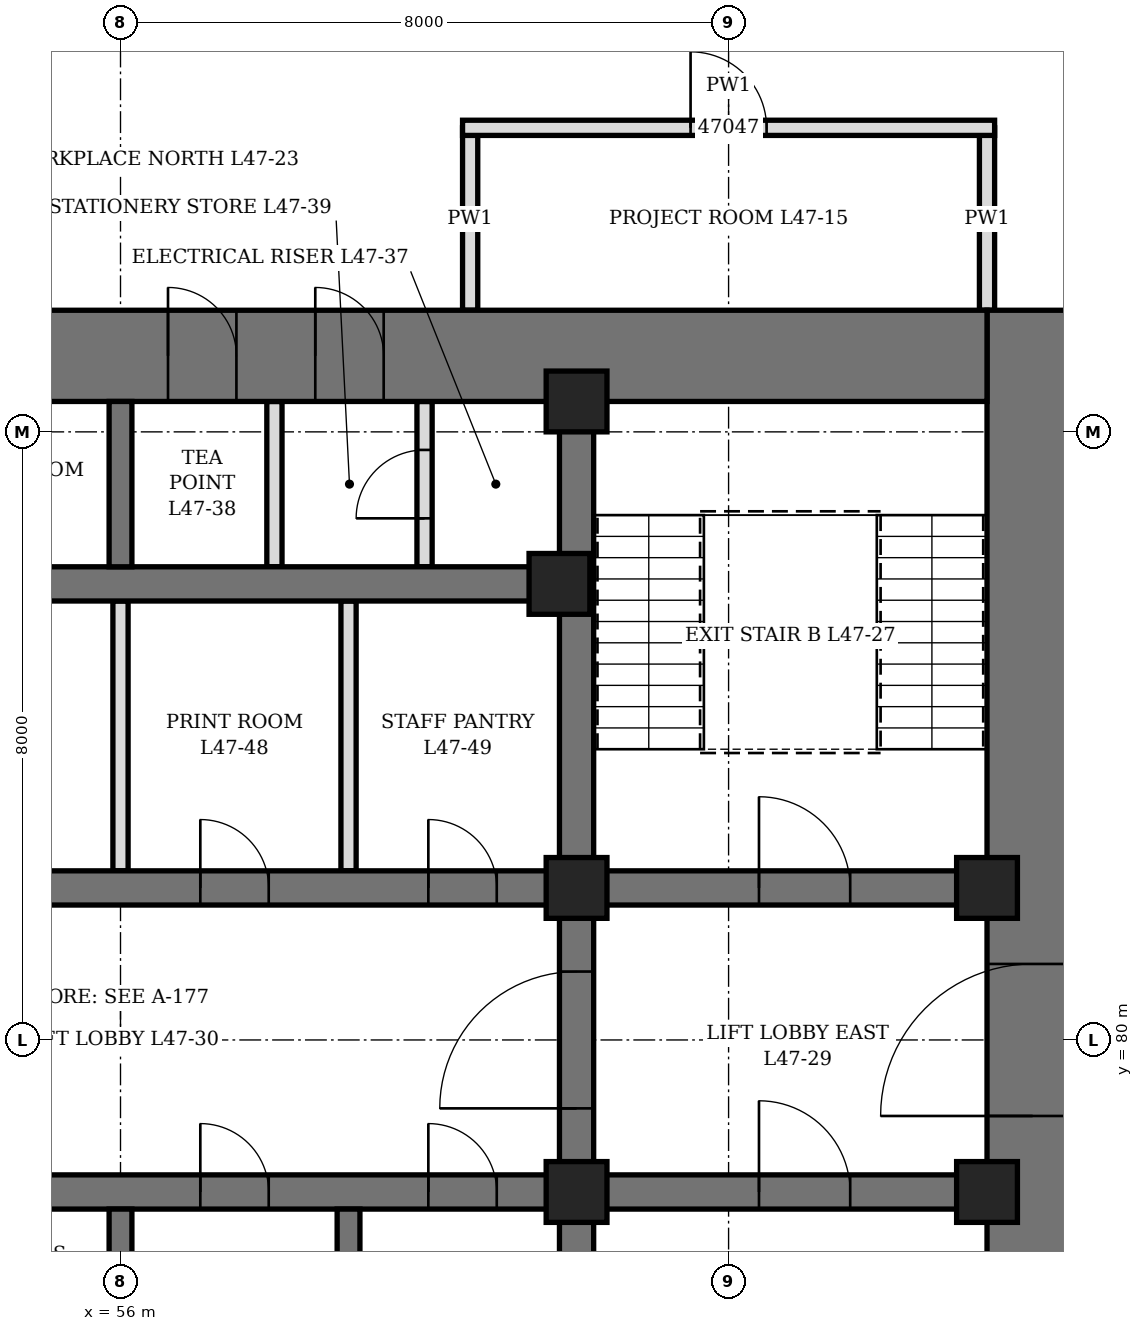
"""IFC4 building model, lengths in metres.
Left out: names, types, materials, properties, quantities, classifications, styles, units other than length and angle.
Written with IfcOpenShell. Run it as: python <this file> out.ifc"""

import sys

from ifc_helpers import new_model, si_unit, direction, frame, frame_2d, origin, origin_2d, place, context, subcontext, project, spatial, rectangle, hollow_rectangle, extrude, element, fill, save


model = new_model("IFC4")
c1 = context("Model", 3, precision=1e-05, world=origin(), true_north=direction((0.0, 1.0)))
c2 = subcontext(c1, "Body", "Model", "MODEL_VIEW")
j1 = project(units=[si_unit("LENGTHUNIT", "METRE"), si_unit("PLANEANGLEUNIT", "RADIAN")], contexts=[c1])
p1 = place(None, origin())
s1 = spatial("IfcSite", under=j1, at=p1, CompositionType="ELEMENT")
p2 = place(p1, origin())
s2 = spatial("IfcBuilding", under=s1, at=p2, CompositionType="ELEMENT")
p3 = place(p2, frame((0.0, 0.0, 210.7)))
s3 = spatial("IfcBuildingStorey", under=s2, at=p3, CompositionType="ELEMENT", Elevation=210.7)
p4 = place(p3, frame((68.0, 70.4, 0.0), z_axis=(0.0, 0.0, 1.0), x_axis=(0.0, 1.0, 0.0)))
e1 = element("IfcWall", 1, at=p4, inside=s3, PredefinedType="SHEAR", context=c2, shape_type="SweptSolid", body=[
    extrude(rectangle(XDim=19.2, YDim=1.2, at=frame_2d((9.6, 0.0))), origin(), (0.0, 0.0, 1.0), 4.2),
])
p5 = place(p4, frame((8.6, 0.0, 0.0)))
e2 = element("IfcOpeningElement", 2, at=p5, cuts=e1, PredefinedType="OPENING", context=c2, shape_type="SweptSolid", body=[
    extrude(rectangle(XDim=2.0, YDim=2.4, at=frame_2d((1.0, 1.2))), frame((0.0, 0.61, 0.0), z_axis=(0.0, -1.0, 0.0), x_axis=(1.0, 0.0, 0.0)), (0.0, 0.0, 1.0), 1.22),
])
p6 = place(p3, frame((44.6, 89.0, 0.0), z_axis=(0.0, 0.0, 1.0), x_axis=(1.0, 0.0, 0.0)))
e3 = element("IfcWall", 3, at=p6, inside=s3, PredefinedType="SHEAR", context=c2, shape_type="SweptSolid", body=[
    extrude(rectangle(XDim=22.8, YDim=1.2, at=frame_2d((11.4, 0.0))), origin(), (0.0, 0.0, 1.0), 4.2),
])
p7 = place(p6, frame((6.525, 0.0, 0.0)))
e4 = element("IfcOpeningElement", 4, at=p7, cuts=e3, PredefinedType="OPENING", context=c2, shape_type="SweptSolid", body=[
    extrude(rectangle(XDim=1.0, YDim=2.1, at=frame_2d((0.5, 1.05))), frame((0.0, 0.61, 0.0), z_axis=(0.0, -1.0, 0.0), x_axis=(1.0, 0.0, 0.0)), (0.0, 0.0, 1.0), 1.22),
])
p8 = place(p6, frame((9.45, 0.0, 0.0)))
e5 = element("IfcOpeningElement", 5, at=p8, cuts=e3, PredefinedType="OPENING", context=c2, shape_type="SweptSolid", body=[
    extrude(rectangle(XDim=0.9, YDim=2.1, at=frame_2d((0.45, 1.05))), frame((0.0, 0.61, 0.0), z_axis=(0.0, -1.0, 0.0), x_axis=(1.0, 0.0, 0.0)), (0.0, 0.0, 1.0), 1.22),
])
p9 = place(p6, frame((12.025, 0.0, 0.0)))
e6 = element("IfcOpeningElement", 6, at=p9, cuts=e3, PredefinedType="OPENING", context=c2, shape_type="SweptSolid", body=[
    extrude(rectangle(XDim=0.9, YDim=2.1, at=frame_2d((0.45, 1.05))), frame((0.0, 0.61, 0.0), z_axis=(0.0, -1.0, 0.0), x_axis=(1.0, 0.0, 0.0)), (0.0, 0.0, 1.0), 1.22),
])
p10 = place(p6, frame((13.962, 0.0, 0.0)))
e7 = element("IfcOpeningElement", 7, at=p10, cuts=e3, PredefinedType="OPENING", context=c2, shape_type="SweptSolid", body=[
    extrude(rectangle(XDim=0.9, YDim=2.1, at=frame_2d((0.45, 1.05))), frame((0.0, 0.61, 0.0), z_axis=(0.0, -1.0, 0.0), x_axis=(1.0, 0.0, 0.0)), (0.0, 0.0, 1.0), 1.22),
])
p11 = place(p3, frame((62.0, 71.6, 0.0), z_axis=(0.0, 0.0, 1.0), x_axis=(0.0, 1.0, 0.0)))
e8 = element("IfcWall", 8, at=p11, inside=s3, PredefinedType="SHEAR", context=c2, shape_type="SweptSolid", body=[
    extrude(rectangle(XDim=16.8, YDim=0.45, at=frame_2d((8.4, 0.0))), origin(), (0.0, 0.0, 1.0), 4.2),
])
p12 = place(p11, frame((7.5, 0.0, 0.0)))
e9 = element("IfcOpeningElement", 9, at=p12, cuts=e8, PredefinedType="OPENING", context=c2, shape_type="SweptSolid", body=[
    extrude(rectangle(XDim=1.8, YDim=2.4, at=frame_2d((0.9, 1.2))), frame((0.0, 0.235, 0.0), z_axis=(0.0, -1.0, 0.0), x_axis=(1.0, 0.0, 0.0)), (0.0, 0.0, 1.0), 0.47),
])
p13 = place(p3, frame((62.225, 78.0, 0.0), z_axis=(0.0, 0.0, 1.0), x_axis=(1.0, 0.0, 0.0)))
e10 = element("IfcWall", 10, at=p13, inside=s3, PredefinedType="SHEAR", context=c2, shape_type="SweptSolid", body=[
    extrude(rectangle(XDim=5.175, YDim=0.45, at=frame_2d((2.587, 0.0))), origin(), (0.0, 0.0, 1.0), 4.2),
])
p14 = place(p13, frame((2.175, 0.0, 0.0)))
e11 = element("IfcOpeningElement", 11, at=p14, cuts=e10, PredefinedType="OPENING", context=c2, shape_type="SweptSolid", body=[
    extrude(rectangle(XDim=1.2, YDim=2.1, at=frame_2d((0.6, 1.05))), frame((0.0, 0.235, 0.0), z_axis=(0.0, -1.0, 0.0), x_axis=(1.0, 0.0, 0.0)), (0.0, 0.0, 1.0), 0.47),
])
p15 = place(p3, frame((62.225, 82.0, 0.0), z_axis=(0.0, 0.0, 1.0), x_axis=(1.0, 0.0, 0.0)))
e12 = element("IfcWall", 12, at=p15, inside=s3, PredefinedType="SHEAR", context=c2, shape_type="SweptSolid", body=[
    extrude(rectangle(XDim=5.175, YDim=0.45, at=frame_2d((2.587, 0.0))), origin(), (0.0, 0.0, 1.0), 4.2),
])
p16 = place(p15, frame((2.175, 0.0, 0.0)))
e13 = element("IfcOpeningElement", 13, at=p16, cuts=e12, PredefinedType="OPENING", context=c2, shape_type="SweptSolid", body=[
    extrude(rectangle(XDim=1.2, YDim=2.1, at=frame_2d((0.6, 1.05))), frame((0.0, 0.235, 0.0), z_axis=(0.0, -1.0, 0.0), x_axis=(1.0, 0.0, 0.0)), (0.0, 0.0, 1.0), 0.47),
])
p17 = place(p3, frame((50.225, 78.0, 0.0), z_axis=(0.0, 0.0, 1.0), x_axis=(1.0, 0.0, 0.0)))
e14 = element("IfcWall", 14, at=p17, inside=s3, PredefinedType="SHEAR", context=c2, shape_type="SweptSolid", body=[
    extrude(rectangle(XDim=11.55, YDim=0.45, at=frame_2d((5.775, 0.0))), origin(), (0.0, 0.0, 1.0), 4.2),
])
p18 = place(p17, frame((0.825, 0.0, 0.0)))
e15 = element("IfcOpeningElement", 15, at=p18, cuts=e14, PredefinedType="OPENING", context=c2, shape_type="SweptSolid", body=[
    extrude(rectangle(XDim=0.9, YDim=2.1, at=frame_2d((0.45, 1.05))), frame((0.0, 0.235, 0.0), z_axis=(0.0, -1.0, 0.0), x_axis=(1.0, 0.0, 0.0)), (0.0, 0.0, 1.0), 0.47),
])
p19 = place(p17, frame((3.825, 0.0, 0.0)))
e16 = element("IfcOpeningElement", 16, at=p19, cuts=e14, PredefinedType="OPENING", context=c2, shape_type="SweptSolid", body=[
    extrude(rectangle(XDim=0.9, YDim=2.1, at=frame_2d((0.45, 1.05))), frame((0.0, 0.235, 0.0), z_axis=(0.0, -1.0, 0.0), x_axis=(1.0, 0.0, 0.0)), (0.0, 0.0, 1.0), 0.47),
])
p20 = place(p17, frame((6.825, 0.0, 0.0)))
e17 = element("IfcOpeningElement", 17, at=p20, cuts=e14, PredefinedType="OPENING", context=c2, shape_type="SweptSolid", body=[
    extrude(rectangle(XDim=0.9, YDim=2.1, at=frame_2d((0.45, 1.05))), frame((0.0, 0.235, 0.0), z_axis=(0.0, -1.0, 0.0), x_axis=(1.0, 0.0, 0.0)), (0.0, 0.0, 1.0), 0.47),
])
p21 = place(p17, frame((9.825, 0.0, 0.0)))
e18 = element("IfcOpeningElement", 18, at=p21, cuts=e14, PredefinedType="OPENING", context=c2, shape_type="SweptSolid", body=[
    extrude(rectangle(XDim=0.9, YDim=2.1, at=frame_2d((0.45, 1.05))), frame((0.0, 0.235, 0.0), z_axis=(0.0, -1.0, 0.0), x_axis=(1.0, 0.0, 0.0)), (0.0, 0.0, 1.0), 0.47),
])
p22 = place(p3, frame((50.225, 82.0, 0.0), z_axis=(0.0, 0.0, 1.0), x_axis=(1.0, 0.0, 0.0)))
e19 = element("IfcWall", 19, at=p22, inside=s3, PredefinedType="SHEAR", context=c2, shape_type="SweptSolid", body=[
    extrude(rectangle(XDim=11.55, YDim=0.45, at=frame_2d((5.775, 0.0))), origin(), (0.0, 0.0, 1.0), 4.2),
])
p23 = place(p22, frame((0.825, 0.0, 0.0)))
e20 = element("IfcOpeningElement", 20, at=p23, cuts=e19, PredefinedType="OPENING", context=c2, shape_type="SweptSolid", body=[
    extrude(rectangle(XDim=0.9, YDim=2.1, at=frame_2d((0.45, 1.05))), frame((0.0, 0.235, 0.0), z_axis=(0.0, -1.0, 0.0), x_axis=(1.0, 0.0, 0.0)), (0.0, 0.0, 1.0), 0.47),
])
p24 = place(p22, frame((3.825, 0.0, 0.0)))
e21 = element("IfcOpeningElement", 21, at=p24, cuts=e19, PredefinedType="OPENING", context=c2, shape_type="SweptSolid", body=[
    extrude(rectangle(XDim=0.9, YDim=2.1, at=frame_2d((0.45, 1.05))), frame((0.0, 0.235, 0.0), z_axis=(0.0, -1.0, 0.0), x_axis=(1.0, 0.0, 0.0)), (0.0, 0.0, 1.0), 0.47),
])
p25 = place(p22, frame((6.825, 0.0, 0.0)))
e22 = element("IfcOpeningElement", 22, at=p25, cuts=e19, PredefinedType="OPENING", context=c2, shape_type="SweptSolid", body=[
    extrude(rectangle(XDim=0.9, YDim=2.1, at=frame_2d((0.45, 1.05))), frame((0.0, 0.235, 0.0), z_axis=(0.0, -1.0, 0.0), x_axis=(1.0, 0.0, 0.0)), (0.0, 0.0, 1.0), 0.47),
])
p26 = place(p22, frame((9.825, 0.0, 0.0)))
e23 = element("IfcOpeningElement", 23, at=p26, cuts=e19, PredefinedType="OPENING", context=c2, shape_type="SweptSolid", body=[
    extrude(rectangle(XDim=0.9, YDim=2.1, at=frame_2d((0.45, 1.05))), frame((0.0, 0.235, 0.0), z_axis=(0.0, -1.0, 0.0), x_axis=(1.0, 0.0, 0.0)), (0.0, 0.0, 1.0), 0.47),
])
p27 = place(p3, frame((50.225, 86.0, 0.0), z_axis=(0.0, 0.0, 1.0), x_axis=(1.0, 0.0, 0.0)))
e24 = element("IfcWall", 24, at=p27, inside=s3, PredefinedType="SHEAR", context=c2, shape_type="SweptSolid", body=[
    extrude(rectangle(XDim=11.55, YDim=0.45, at=frame_2d((5.775, 0.0))), origin(), (0.0, 0.0, 1.0), 4.2),
])
for number, where, z_axis, x_axis in (
    (25, (56.0, 74.15, 0.0), (0.0, 0.0, 1.0), (0.0, 1.0, 0.0)),
    (26, (59.0, 74.15, 0.0), (0.0, 0.0, 1.0), (0.0, 1.0, 0.0)),
):
    element("IfcWall", number, at=place(p3, frame(where, z_axis=z_axis, x_axis=x_axis)), inside=s3, PredefinedType="SHEAR", context=c2, shape_type="SweptSolid", body=[
        extrude(rectangle(XDim=3.625, YDim=0.3, at=frame_2d((1.812, 0.0))), origin(), (0.0, 0.0, 1.0), 4.2),
    ])
p28 = place(p3, frame((56.0, 86.225, 0.0), z_axis=(0.0, 0.0, 1.0), x_axis=(0.0, 1.0, 0.0)))
e27 = element("IfcWall", 27, at=p28, inside=s3, PredefinedType="SHEAR", context=c2, shape_type="SweptSolid", body=[
    extrude(rectangle(XDim=2.175, YDim=0.3, at=frame_2d((1.087, 0.0))), origin(), (0.0, 0.0, 1.0), 4.2),
])
for number, where, z_axis, x_axis in (
    (28, (61.775, 86.0, 0.0), (0.0, 0.0, 1.0), (1.0, 0.0, 0.0)),
    (29, (62.0, 78.0, 0.0), (0.0, 0.0, 1.0), (1.0, 0.0, 0.0)),
    (30, (62.0, 82.0, 0.0), (0.0, 0.0, 1.0), (1.0, 0.0, 0.0)),
    (31, (62.0, 88.4, 0.0), (0.0, 0.0, 1.0), (1.0, 0.0, 0.0)),
    (32, (67.4, 78.0, 0.0), (0.0, 0.0, 1.0), (1.0, 0.0, 0.0)),
    (33, (67.4, 82.0, 0.0), (0.0, 0.0, 1.0), (1.0, 0.0, 0.0)),
):
    element("IfcColumn", number, at=place(p3, frame(where, z_axis=z_axis, x_axis=x_axis)), inside=s3, PredefinedType="COLUMN", context=c2, shape_type="SweptSolid", body=[
        extrude(hollow_rectangle(XDim=0.8, YDim=0.8, WallThickness=0.1, at=origin_2d()), origin(), (0.0, 0.0, 1.0), 4.2),
    ])
p29 = place(p3, frame((60.0, 86.225, 0.0), z_axis=(0.0, 0.0, 1.0), x_axis=(0.0, 1.0, 0.0)))
e34 = element("IfcWall", 34, at=p29, inside=s3, PredefinedType="PARTITIONING", context=c2, shape_type="SweptSolid", body=[
    extrude(rectangle(XDim=2.175, YDim=0.2, at=frame_2d((1.087, 0.0))), origin(), (0.0, 0.0, 1.0), 4.04),
])
p30 = place(p29, frame((0.637, 0.0, 0.0)))
e35 = element("IfcOpeningElement", 35, at=p30, cuts=e34, PredefinedType="OPENING", context=c2, shape_type="SweptSolid", body=[
    extrude(rectangle(XDim=0.9, YDim=2.1, at=frame_2d((0.45, 1.05))), frame((0.0, 0.11, 0.0), z_axis=(0.0, -1.0, 0.0), x_axis=(1.0, 0.0, 0.0)), (0.0, 0.0, 1.0), 0.22),
])
p31 = place(p3, frame((58.025, 86.225, 0.0), z_axis=(0.0, 0.0, 1.0), x_axis=(0.0, 1.0, 0.0)))
e36 = element("IfcWall", 36, at=p31, inside=s3, PredefinedType="PARTITIONING", context=c2, shape_type="SweptSolid", body=[
    extrude(rectangle(XDim=2.175, YDim=0.2, at=frame_2d((1.087, 0.0))), origin(), (0.0, 0.0, 1.0), 4.04),
])
p32 = place(p3, frame((56.0, 82.225, 0.0), z_axis=(0.0, 0.0, 1.0), x_axis=(0.0, 1.0, 0.0)))
e37 = element("IfcWall", 37, at=p32, inside=s3, PredefinedType="PARTITIONING", context=c2, shape_type="SweptSolid", body=[
    extrude(rectangle(XDim=3.55, YDim=0.2, at=frame_2d((1.775, 0.0))), origin(), (0.0, 0.0, 1.0), 3.14),
])
p33 = place(p3, frame((59.0, 82.225, 0.0), z_axis=(0.0, 0.0, 1.0), x_axis=(0.0, 1.0, 0.0)))
e38 = element("IfcWall", 38, at=p33, inside=s3, PredefinedType="PARTITIONING", context=c2, shape_type="SweptSolid", body=[
    extrude(rectangle(XDim=3.55, YDim=0.2, at=frame_2d((1.775, 0.0))), origin(), (0.0, 0.0, 1.0), 4.04),
])
for number, where, z_axis, x_axis in (
    (39, (60.6, 89.6, 0.0), (0.0, 0.0, 1.0), (0.0, 1.0, 0.0)),
    (40, (67.4, 89.6, 0.0), (0.0, 0.0, 1.0), (0.0, 1.0, 0.0)),
):
    element("IfcWall", number, at=place(p3, frame(where, z_axis=z_axis, x_axis=x_axis)), inside=s3, PredefinedType="PARTITIONING", context=c2, shape_type="SweptSolid", body=[
        extrude(rectangle(XDim=2.4, YDim=0.2, at=frame_2d((1.2, 0.0))), origin(), (0.0, 0.0, 1.0), 4.04),
    ])
p34 = place(p3, frame((60.5, 92.0, 0.0), z_axis=(0.0, 0.0, 1.0), x_axis=(1.0, 0.0, 0.0)))
e41 = element("IfcWall", 41, at=p34, inside=s3, PredefinedType="PARTITIONING", context=c2, shape_type="SweptSolid", body=[
    extrude(rectangle(XDim=7.0, YDim=0.2, at=frame_2d((3.5, 0.0))), origin(), (0.0, 0.0, 1.0), 4.04),
])
p35 = place(p34, frame((3.0, 0.0, 0.0)))
e42 = element("IfcOpeningElement", 42, at=p35, cuts=e41, PredefinedType="OPENING", context=c2, shape_type="SweptSolid", body=[
    extrude(rectangle(XDim=1.0, YDim=2.1, at=frame_2d((0.5, 1.05))), frame((0.0, 0.11, 0.0), z_axis=(0.0, -1.0, 0.0), x_axis=(1.0, 0.0, 0.0)), (0.0, 0.0, 1.0), 0.22),
])
p36 = place(p9, origin())
e43 = element("IfcDoor", 43, at=p36, inside=s3, OperationType="SINGLE_SWING_LEFT", PredefinedType="DOOR", context=c2, shape_type="SweptSolid", body=[
    extrude(rectangle(XDim=0.9, YDim=2.1, at=frame_2d((0.45, 1.05))), frame((0.0, 0.35, 0.0), z_axis=(0.0, -1.0, 0.0), x_axis=(1.0, 0.0, 0.0)), (0.0, 0.0, 1.0), 0.7),
])
fill(e6, e43)
p37 = place(p10, origin())
e44 = element("IfcDoor", 44, at=p37, inside=s3, OperationType="SINGLE_SWING_LEFT", PredefinedType="DOOR", context=c2, shape_type="SweptSolid", body=[
    extrude(rectangle(XDim=0.9, YDim=2.1, at=frame_2d((0.45, 1.05))), frame((0.0, 0.35, 0.0), z_axis=(0.0, -1.0, 0.0), x_axis=(1.0, 0.0, 0.0)), (0.0, 0.0, 1.0), 0.7),
])
fill(e7, e44)
p38 = place(p30, origin())
e45 = element("IfcDoor", 45, at=p38, inside=s3, OperationType="SINGLE_SWING_LEFT", PredefinedType="DOOR", context=c2, shape_type="SweptSolid", body=[
    extrude(rectangle(XDim=0.9, YDim=2.1, at=frame_2d((0.45, 1.05))), frame((0.0, 0.1, 0.0), z_axis=(0.0, -1.0, 0.0), x_axis=(1.0, 0.0, 0.0)), (0.0, 0.0, 1.0), 0.199),
])
fill(e35, e45)
p39 = place(p20, origin())
e46 = element("IfcDoor", 46, at=p39, inside=s3, OperationType="SINGLE_SWING_LEFT", PredefinedType="DOOR", context=c2, shape_type="SweptSolid", body=[
    extrude(rectangle(XDim=0.9, YDim=2.1, at=frame_2d((0.45, 1.05))), frame((0.0, 0.225, 0.0), z_axis=(0.0, -1.0, 0.0), x_axis=(1.0, 0.0, 0.0)), (0.0, 0.0, 1.0), 0.449),
])
fill(e17, e46)
p40 = place(p21, origin())
e47 = element("IfcDoor", 47, at=p40, inside=s3, OperationType="SINGLE_SWING_LEFT", PredefinedType="DOOR", context=c2, shape_type="SweptSolid", body=[
    extrude(rectangle(XDim=0.9, YDim=2.1, at=frame_2d((0.45, 1.05))), frame((0.0, 0.225, 0.0), z_axis=(0.0, -1.0, 0.0), x_axis=(1.0, 0.0, 0.0)), (0.0, 0.0, 1.0), 0.449),
])
fill(e18, e47)
p41 = place(p25, origin())
e48 = element("IfcDoor", 48, at=p41, inside=s3, OperationType="SINGLE_SWING_LEFT", PredefinedType="DOOR", context=c2, shape_type="SweptSolid", body=[
    extrude(rectangle(XDim=0.9, YDim=2.1, at=frame_2d((0.45, 1.05))), frame((0.0, 0.225, 0.0), z_axis=(0.0, -1.0, 0.0), x_axis=(1.0, 0.0, 0.0)), (0.0, 0.0, 1.0), 0.449),
])
fill(e22, e48)
p42 = place(p26, origin())
e49 = element("IfcDoor", 49, at=p42, inside=s3, OperationType="SINGLE_SWING_LEFT", PredefinedType="DOOR", context=c2, shape_type="SweptSolid", body=[
    extrude(rectangle(XDim=0.9, YDim=2.1, at=frame_2d((0.45, 1.05))), frame((0.0, 0.225, 0.0), z_axis=(0.0, -1.0, 0.0), x_axis=(1.0, 0.0, 0.0)), (0.0, 0.0, 1.0), 0.449),
])
fill(e23, e49)
p43 = place(p16, origin())
e50 = element("IfcDoor", 50, at=p43, inside=s3, OperationType="SINGLE_SWING_LEFT", PredefinedType="DOOR", context=c2, shape_type="SweptSolid", body=[
    extrude(rectangle(XDim=1.2, YDim=2.1, at=frame_2d((0.6, 1.05))), frame((0.0, 0.225, 0.0), z_axis=(0.0, -1.0, 0.0), x_axis=(1.0, 0.0, 0.0)), (0.0, 0.0, 1.0), 0.449),
])
fill(e13, e50)
p44 = place(p5, origin())
e51 = element("IfcDoor", 51, at=p44, inside=s3, OperationType="DOUBLE_DOOR_SINGLE_SWING", PredefinedType="DOOR", context=c2, shape_type="SweptSolid", body=[
    extrude(rectangle(XDim=2.0, YDim=2.4, at=frame_2d((1.0, 1.2))), frame((0.0, 0.35, 0.0), z_axis=(0.0, -1.0, 0.0), x_axis=(1.0, 0.0, 0.0)), (0.0, 0.0, 1.0), 0.7),
])
fill(e2, e51)
p45 = place(p12, origin())
e52 = element("IfcDoor", 52, at=p45, inside=s3, OperationType="DOUBLE_DOOR_SINGLE_SWING", PredefinedType="DOOR", context=c2, shape_type="SweptSolid", body=[
    extrude(rectangle(XDim=1.8, YDim=2.4, at=frame_2d((0.9, 1.2))), frame((0.0, 0.225, 0.0), z_axis=(0.0, -1.0, 0.0), x_axis=(1.0, 0.0, 0.0)), (0.0, 0.0, 1.0), 0.449),
])
fill(e9, e52)
p46 = place(p14, origin())
e53 = element("IfcDoor", 53, at=p46, inside=s3, OperationType="SINGLE_SWING_RIGHT", PredefinedType="DOOR", context=c2, shape_type="SweptSolid", body=[
    extrude(rectangle(XDim=1.2, YDim=2.1, at=frame_2d((0.6, 1.05))), frame((0.0, 0.225, 0.0), z_axis=(0.0, -1.0, 0.0), x_axis=(1.0, 0.0, 0.0)), (0.0, 0.0, 1.0), 0.449),
])
fill(e11, e53)
p47 = place(p35, origin())
e54 = element("IfcDoor", 54, at=p47, inside=s3, OperationType="SINGLE_SWING_LEFT", PredefinedType="DOOR", context=c2, shape_type="SweptSolid", body=[
    extrude(rectangle(XDim=1.0, YDim=2.1, at=frame_2d((0.5, 1.05))), frame((0.0, 0.1, 0.0), z_axis=(0.0, -1.0, 0.0), x_axis=(1.0, 0.0, 0.0)), (0.0, 0.0, 1.0), 0.199),
])
fill(e42, e54)
save(model, sys.argv[1])
